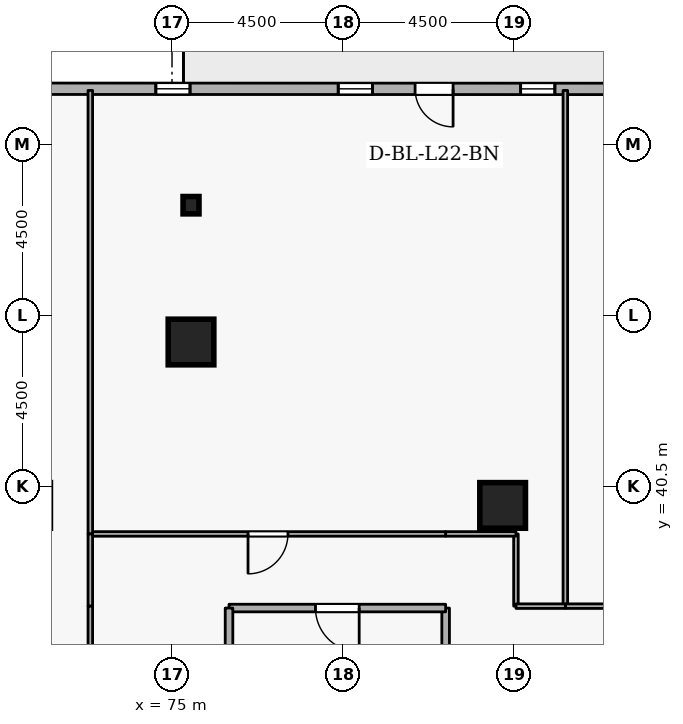
"""IFC4 building model, lengths in metres.
Left out: names, types, materials, properties, quantities, classifications, styles, units other than length and angle.
Written with IfcOpenShell. Run it as: python <this file> out.ifc"""

import sys

from ifc_helpers import new_model, si_unit, direction, frame, frame_2d, origin, origin_2d, place, context, subcontext, project, spatial, rectangle, i_section, extrude, element, fill, save


model = new_model("IFC4")
c1 = context("Model", 3, precision=1e-05, world=origin(), true_north=direction((0.0, 1.0)))
c2 = subcontext(c1, "Body", "Model", "MODEL_VIEW")
j1 = project(units=[si_unit("LENGTHUNIT", "METRE"), si_unit("PLANEANGLEUNIT", "RADIAN")], contexts=[c1])
p1 = place(None, origin())
s1 = spatial("IfcSite", under=j1, at=p1, CompositionType="ELEMENT")
p2 = place(p1, origin())
s2 = spatial("IfcBuilding", under=s1, at=p2, CompositionType="ELEMENT")
p3 = place(p2, frame((0.0, 0.0, 87.3)))
s3 = spatial("IfcBuildingStorey", under=s2, at=p3, CompositionType="ELEMENT", Elevation=87.3)
for number, where, z_axis, x_axis in (
    (1, (75.5, 44.3, 0.0), (0.0, 0.0, 1.0), (1.0, 0.0, 0.0)),
    (2, (83.7, 40.0, 0.0), (0.0, 0.0, 1.0), (1.0, 0.0, 0.0)),
):
    element("IfcColumn", number, at=place(p3, frame(where, z_axis=z_axis, x_axis=x_axis)), inside=s3, PredefinedType="COLUMN", context=c2, shape_type="SweptSolid", body=[
        extrude(rectangle(XDim=1.2, YDim=1.2, at=origin_2d()), origin(), (0.0, 0.0, 1.0), 3.6),
    ])
p4 = place(p3, frame((75.5, 47.9, 0.0), z_axis=(0.0, 0.0, 1.0), x_axis=(1.0, 0.0, 0.0)))
e3 = element("IfcColumn", 3, at=p4, inside=s3, PredefinedType="COLUMN", context=c2, shape_type="SweptSolid", body=[
    extrude(i_section(OverallWidth=0.418, OverallDepth=0.456, WebThickness=0.042, FlangeThickness=0.067, FilletRadius=0.015, at=origin_2d()), origin(), (0.0, 0.0, 1.0), 3.6),
])
p5 = place(p3, frame((101.274, 50.956, 0.0), z_axis=(0.0, 0.0, 1.0), x_axis=(-0.999999970468, 0.000243032466, 0.0)))
e4 = element("IfcWall", 4, at=p5, inside=s3, PredefinedType="STANDARD", context=c2, shape_type="SweptSolid", body=[
    extrude(rectangle(XDim=34.155, YDim=0.3, at=frame_2d((17.078, 0.0))), origin(), (0.0, 0.0, 1.0), 2.7),
])
p6 = place(p5, frame((18.878, 0.0, 0.0)))
e5 = element("IfcOpeningElement", 5, at=p6, cuts=e4, PredefinedType="OPENING", context=c2, shape_type="SweptSolid", body=[
    extrude(rectangle(XDim=1.0, YDim=2.08, at=frame_2d((0.5, 1.04))), frame((0.0, 0.16, 0.0), z_axis=(0.0, -1.0, 0.0), x_axis=(1.0, 0.0, 0.0)), (0.0, 0.0, 1.0), 0.32),
])
p7 = place(p5, frame((1.8, 0.0, 0.72)))
e6 = element("IfcOpeningElement", 6, at=p7, cuts=e4, PredefinedType="OPENING", context=c2, shape_type="SweptSolid", body=[
    extrude(rectangle(XDim=0.9, YDim=1.75, at=frame_2d((0.45, 0.875))), frame((0.0, 0.16, 0.0), z_axis=(0.0, -1.0, 0.0), x_axis=(1.0, 0.0, 0.0)), (0.0, 0.0, 1.0), 0.32),
])
p8 = place(p5, frame((6.6, 0.0, 0.72)))
e7 = element("IfcOpeningElement", 7, at=p8, cuts=e4, PredefinedType="OPENING", context=c2, shape_type="SweptSolid", body=[
    extrude(rectangle(XDim=0.9, YDim=1.75, at=frame_2d((0.45, 0.875))), frame((0.0, 0.16, 0.0), z_axis=(0.0, -1.0, 0.0), x_axis=(1.0, 0.0, 0.0)), (0.0, 0.0, 1.0), 0.32),
])
p9 = place(p5, frame((11.4, 0.0, 0.72)))
e8 = element("IfcOpeningElement", 8, at=p9, cuts=e4, PredefinedType="OPENING", context=c2, shape_type="SweptSolid", body=[
    extrude(rectangle(XDim=0.9, YDim=1.75, at=frame_2d((0.45, 0.875))), frame((0.0, 0.16, 0.0), z_axis=(0.0, -1.0, 0.0), x_axis=(1.0, 0.0, 0.0)), (0.0, 0.0, 1.0), 0.32),
])
p10 = place(p5, frame((16.2, 0.0, 0.72)))
e9 = element("IfcOpeningElement", 9, at=p10, cuts=e4, PredefinedType="OPENING", context=c2, shape_type="SweptSolid", body=[
    extrude(rectangle(XDim=0.9, YDim=1.75, at=frame_2d((0.45, 0.875))), frame((0.0, 0.16, 0.0), z_axis=(0.0, -1.0, 0.0), x_axis=(1.0, 0.0, 0.0)), (0.0, 0.0, 1.0), 0.32),
])
p11 = place(p5, frame((21.0, 0.0, 0.72)))
e10 = element("IfcOpeningElement", 10, at=p11, cuts=e4, PredefinedType="OPENING", context=c2, shape_type="SweptSolid", body=[
    extrude(rectangle(XDim=0.9, YDim=1.75, at=frame_2d((0.45, 0.875))), frame((0.0, 0.16, 0.0), z_axis=(0.0, -1.0, 0.0), x_axis=(1.0, 0.0, 0.0)), (0.0, 0.0, 1.0), 0.32),
])
p12 = place(p5, frame((25.8, 0.0, 0.72)))
e11 = element("IfcOpeningElement", 11, at=p12, cuts=e4, PredefinedType="OPENING", context=c2, shape_type="SweptSolid", body=[
    extrude(rectangle(XDim=0.9, YDim=1.75, at=frame_2d((0.45, 0.875))), frame((0.0, 0.16, 0.0), z_axis=(0.0, -1.0, 0.0), x_axis=(1.0, 0.0, 0.0)), (0.0, 0.0, 1.0), 0.32),
])
p13 = place(p5, frame((30.6, 0.0, 0.72)))
e12 = element("IfcOpeningElement", 12, at=p13, cuts=e4, PredefinedType="OPENING", context=c2, shape_type="SweptSolid", body=[
    extrude(rectangle(XDim=0.9, YDim=1.75, at=frame_2d((0.45, 0.875))), frame((0.0, 0.16, 0.0), z_axis=(0.0, -1.0, 0.0), x_axis=(1.0, 0.0, 0.0)), (0.0, 0.0, 1.0), 0.32),
])
p14 = place(p3, frame((82.2, 34.8, 0.0), z_axis=(0.0, 0.0, 1.0), x_axis=(0.0, 1.0, 0.0)))
e13 = element("IfcWall", 13, at=p14, inside=s3, PredefinedType="STANDARD", context=c2, shape_type="SweptSolid", body=[
    extrude(rectangle(XDim=2.5, YDim=0.2, at=frame_2d((1.25, 0.0))), origin(), (0.0, 0.0, 1.0), 3.34),
])
p15 = place(p3, frame((82.2, 37.3, 0.0), z_axis=(0.0, 0.0, 1.0), x_axis=(-1.0, 0.0, 0.0)))
e14 = element("IfcWall", 14, at=p15, inside=s3, PredefinedType="STANDARD", context=c2, shape_type="SweptSolid", body=[
    extrude(rectangle(XDim=5.7, YDim=0.2, at=frame_2d((2.85, 0.0))), origin(), (0.0, 0.0, 1.0), 3.34),
])
p16 = place(p15, frame((2.275, 0.0, 0.0)))
e15 = element("IfcOpeningElement", 15, at=p16, cuts=e14, PredefinedType="OPENING", context=c2, shape_type="SweptSolid", body=[
    extrude(rectangle(XDim=1.15, YDim=2.1, at=frame_2d((0.575, 1.05))), frame((0.0, 0.11, 0.0), z_axis=(0.0, -1.0, 0.0), x_axis=(1.0, 0.0, 0.0)), (0.0, 0.0, 1.0), 0.22),
])
p17 = place(p3, frame((76.5, 37.3, 0.0), z_axis=(0.0, 0.0, 1.0), x_axis=(0.0, -1.0, 0.0)))
e16 = element("IfcWall", 16, at=p17, inside=s3, PredefinedType="STANDARD", context=c2, shape_type="SweptSolid", body=[
    extrude(rectangle(XDim=2.5, YDim=0.2, at=frame_2d((1.25, 0.0))), origin(), (0.0, 0.0, 1.0), 3.34),
])
p18 = place(p3, frame((85.35, 37.35, 0.0), z_axis=(0.0, 0.0, 1.0), x_axis=(0.0, 1.0, 0.0)))
e17 = element("IfcWall", 17, at=p18, inside=s3, PredefinedType="PARTITIONING", context=c2, shape_type="SweptSolid", body=[
    extrude(rectangle(XDim=13.57, YDim=0.12, at=frame_2d((6.785, 0.0))), origin(), (0.0, 0.0, 1.0), 3.34),
])
p19 = place(p3, frame((88.5, 37.35, 0.0), z_axis=(0.0, 0.0, 1.0), x_axis=(-1.0, 0.0, 0.0)))
e18 = element("IfcWall", 18, at=p19, inside=s3, PredefinedType="PARTITIONING", context=c2, shape_type="SweptSolid", body=[
    extrude(rectangle(XDim=3.15, YDim=0.12, at=frame_2d((1.575, 0.0))), origin(), (0.0, 0.0, 1.0), 3.34),
])
p20 = place(p19, frame((1.1, 0.0, 0.0)))
e19 = element("IfcOpeningElement", 19, at=p20, cuts=e18, PredefinedType="OPENING", context=c2, shape_type="SweptSolid", body=[
    extrude(rectangle(XDim=0.95, YDim=2.1, at=frame_2d((0.475, 1.05))), frame((0.0, 0.07, 0.0), z_axis=(0.0, -1.0, 0.0), x_axis=(1.0, 0.0, 0.0)), (0.0, 0.0, 1.0), 0.14),
])
p21 = place(p3, frame((84.05, 37.35, 0.0), z_axis=(0.0, 0.0, 1.0), x_axis=(0.0, 1.0, 0.0)))
e20 = element("IfcWall", 20, at=p21, inside=s3, PredefinedType="PARTITIONING", context=c2, shape_type="SweptSolid", body=[
    extrude(rectangle(XDim=1.9, YDim=0.12, at=frame_2d((0.95, 0.0))), origin(), (0.0, 0.0, 1.0), 3.34),
])
p22 = place(p3, frame((84.05, 39.25, 0.0), z_axis=(0.0, 0.0, 1.0), x_axis=(-1.0, 0.0, 0.0)))
e21 = element("IfcWall", 21, at=p22, inside=s3, PredefinedType="PARTITIONING", context=c2, shape_type="SweptSolid", body=[
    extrude(rectangle(XDim=1.85, YDim=0.12, at=frame_2d((0.925, 0.0))), origin(), (0.0, 0.0, 1.0), 3.34),
])
p23 = place(p3, frame((82.2, 39.25, 0.0), z_axis=(0.0, 0.0, 1.0), x_axis=(-1.0, 0.0, 0.0)))
e22 = element("IfcWall", 22, at=p23, inside=s3, PredefinedType="PARTITIONING", context=c2, shape_type="SweptSolid", body=[
    extrude(rectangle(XDim=9.35, YDim=0.12, at=frame_2d((4.675, 0.0))), origin(), (0.0, 0.0, 1.0), 3.34),
])
p24 = place(p23, frame((4.15, 0.0, 0.0)))
e23 = element("IfcOpeningElement", 23, at=p24, cuts=e22, PredefinedType="OPENING", context=c2, shape_type="SweptSolid", body=[
    extrude(rectangle(XDim=1.05, YDim=2.1, at=frame_2d((0.525, 1.05))), frame((0.0, 0.07, 0.0), z_axis=(0.0, -1.0, 0.0), x_axis=(1.0, 0.0, 0.0)), (0.0, 0.0, 1.0), 0.14),
])
p25 = place(p3, frame((72.85, 39.25, 0.0), z_axis=(0.0, 0.0, 1.0), x_axis=(0.0, 1.0, 0.0)))
e24 = element("IfcWall", 24, at=p25, inside=s3, PredefinedType="PARTITIONING", context=c2, shape_type="SweptSolid", body=[
    extrude(rectangle(XDim=11.67, YDim=0.12, at=frame_2d((5.835, 0.0))), origin(), (0.0, 0.0, 1.0), 3.34),
])
p26 = place(p3, frame((85.35, 37.35, 0.0), z_axis=(0.0, 0.0, 1.0), x_axis=(-1.0, 0.0, 0.0)))
e25 = element("IfcWall", 25, at=p26, inside=s3, PredefinedType="PARTITIONING", context=c2, shape_type="SweptSolid", body=[
    extrude(rectangle(XDim=1.3, YDim=0.12, at=frame_2d((0.65, 0.0))), origin(), (0.0, 0.0, 1.0), 3.34),
])
p27 = place(p3, frame((72.85, 39.25, 0.0), z_axis=(0.0, 0.0, 1.0), x_axis=(0.0, -1.0, 0.0)))
e26 = element("IfcWall", 26, at=p27, inside=s3, PredefinedType="PARTITIONING", context=c2, shape_type="SweptSolid", body=[
    extrude(rectangle(XDim=1.9, YDim=0.12, at=frame_2d((0.95, 0.0))), origin(), (0.0, 0.0, 1.0), 2.895),
])
p28 = place(p3, frame((72.85, 37.35, 0.0), z_axis=(0.0, 0.0, 1.0), x_axis=(0.0, -1.0, 0.0)))
e27 = element("IfcWall", 27, at=p28, inside=s3, PredefinedType="PARTITIONING", context=c2, shape_type="SweptSolid", body=[
    extrude(rectangle(XDim=4.85, YDim=0.12, at=frame_2d((2.425, 0.0))), origin(), (0.0, 0.0, 1.0), 2.895),
])
p29 = place(p28, frame((1.9, 0.0, 0.0)))
e28 = element("IfcOpeningElement", 28, at=p29, cuts=e27, PredefinedType="OPENING", context=c2, shape_type="SweptSolid", body=[
    extrude(rectangle(XDim=1.05, YDim=2.1, at=frame_2d((0.525, 1.05))), frame((0.0, 0.07, 0.0), z_axis=(0.0, -1.0, 0.0), x_axis=(1.0, 0.0, 0.0)), (0.0, 0.0, 1.0), 0.14),
])
p30 = place(p6, origin())
e29 = element("IfcDoor", 29, at=p30, inside=s3, OperationType="SINGLE_SWING_LEFT", PredefinedType="DOOR", context=c2, shape_type="SweptSolid", body=[
    extrude(rectangle(XDim=1.0, YDim=2.08, at=frame_2d((0.5, 1.04))), frame((0.0, 0.025, 0.0), z_axis=(0.0, -1.0, 0.0), x_axis=(1.0, 0.0, 0.0)), (0.0, 0.0, 1.0), 0.05),
])
fill(e5, e29)
p31 = place(p10, origin())
e30 = element("IfcWindow", 30, at=p31, inside=s3, PartitioningType="SINGLE_PANEL", PredefinedType="WINDOW", context=c2, shape_type="SweptSolid", body=[
    extrude(rectangle(XDim=0.9, YDim=1.75, at=frame_2d((0.45, 0.875))), frame((0.0, 0.03, 0.0), z_axis=(0.0, -1.0, 0.0), x_axis=(1.0, 0.0, 0.0)), (0.0, 0.0, 1.0), 0.06),
])
fill(e9, e30)
p32 = place(p11, origin())
e31 = element("IfcWindow", 31, at=p32, inside=s3, PartitioningType="SINGLE_PANEL", PredefinedType="WINDOW", context=c2, shape_type="SweptSolid", body=[
    extrude(rectangle(XDim=0.9, YDim=1.75, at=frame_2d((0.45, 0.875))), frame((0.0, 0.03, 0.0), z_axis=(0.0, -1.0, 0.0), x_axis=(1.0, 0.0, 0.0)), (0.0, 0.0, 1.0), 0.06),
])
fill(e10, e31)
p33 = place(p12, origin())
e32 = element("IfcWindow", 32, at=p33, inside=s3, PartitioningType="SINGLE_PANEL", PredefinedType="WINDOW", context=c2, shape_type="SweptSolid", body=[
    extrude(rectangle(XDim=0.9, YDim=1.75, at=frame_2d((0.45, 0.875))), frame((0.0, 0.03, 0.0), z_axis=(0.0, -1.0, 0.0), x_axis=(1.0, 0.0, 0.0)), (0.0, 0.0, 1.0), 0.06),
])
fill(e11, e32)
p34 = place(p16, origin())
e33 = element("IfcDoor", 33, at=p34, inside=s3, OperationType="SINGLE_SWING_LEFT", PredefinedType="DOOR", context=c2, shape_type="SweptSolid", body=[
    extrude(rectangle(XDim=1.15, YDim=2.1, at=frame_2d((0.575, 1.05))), frame((0.0, 0.025, 0.0), z_axis=(0.0, -1.0, 0.0), x_axis=(1.0, 0.0, 0.0)), (0.0, 0.0, 1.0), 0.05),
])
fill(e15, e33)
p35 = place(p24, origin())
e34 = element("IfcDoor", 34, at=p35, inside=s3, OperationType="SINGLE_SWING_RIGHT", PredefinedType="DOOR", context=c2, shape_type="SweptSolid", body=[
    extrude(rectangle(XDim=1.05, YDim=2.1, at=frame_2d((0.525, 1.05))), frame((0.0, 0.025, 0.0), z_axis=(0.0, -1.0, 0.0), x_axis=(1.0, 0.0, 0.0)), (0.0, 0.0, 1.0), 0.05),
])
fill(e23, e34)
save(model, sys.argv[1])
